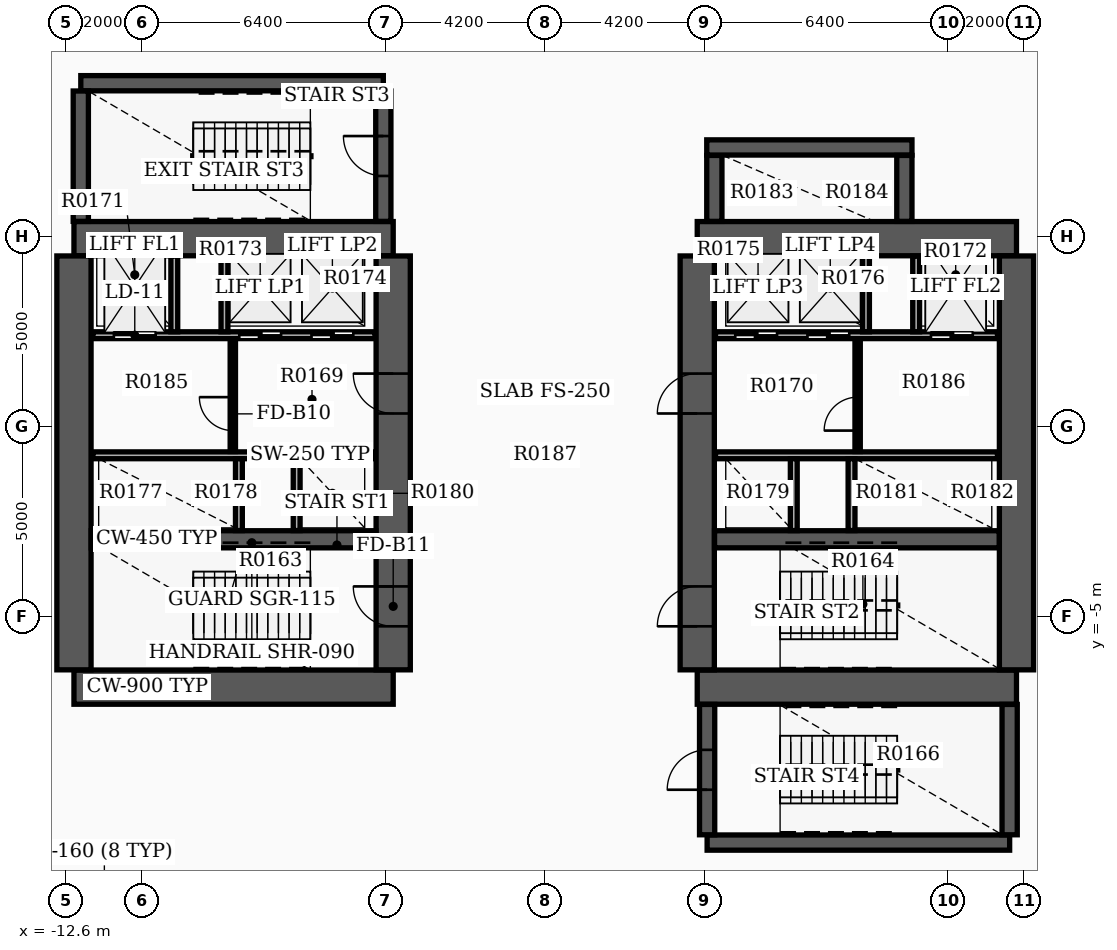
"""IFC4 building model, lengths in metres.
Left out: names, types, materials, properties, quantities, classifications, styles, units other than length and angle.
Written with IfcOpenShell. Run it as: python <this file> out.ifc"""

import sys

from ifc_helpers import new_model, si_unit, direction, frame, frame_2d, origin, place, context, subcontext, project, spatial, rectangle, extrude, element, fill, save


model = new_model("IFC4")
c1 = context("Model", 3, precision=1e-05, world=origin(), true_north=direction((0.0, 1.0)))
c2 = subcontext(c1, "Body", "Model", "MODEL_VIEW")
j1 = project(units=[si_unit("LENGTHUNIT", "METRE"), si_unit("PLANEANGLEUNIT", "RADIAN")], contexts=[c1])
p1 = place(None, origin())
s1 = spatial("IfcSite", under=j1, at=p1, CompositionType="ELEMENT")
p2 = place(p1, origin())
s2 = spatial("IfcBuilding", under=s1, at=p2, CompositionType="ELEMENT")
p3 = place(p2, frame((0.0, 0.0, 10.2)))
s3 = spatial("IfcBuildingStorey", under=s2, at=p3, CompositionType="ELEMENT", Elevation=10.2)
for number, where, z_axis, x_axis in (
    (1, (-12.4, -6.85, 0.0), (0.0, 0.0, 1.0), (1.0, 0.0, 0.0)),
    (2, (-12.4, 4.95, 0.0), (0.0, 0.0, 1.0), (1.0, 0.0, 0.0)),
):
    element("IfcWall", number, at=place(p3, frame(where, z_axis=z_axis, x_axis=x_axis)), inside=s3, PredefinedType="SHEAR", context=c2, shape_type="SweptSolid", body=[
        extrude(rectangle(XDim=8.4, YDim=0.9, at=frame_2d((4.2, 0.0))), origin(), (0.0, 0.0, 1.0), 4.25),
    ])
p4 = place(p3, frame((-12.4, -6.395, 0.0), z_axis=(0.0, 0.0, 1.0), x_axis=(0.0, 1.0, 0.0)))
e3 = element("IfcWall", 3, at=p4, inside=s3, PredefinedType="SHEAR", context=c2, shape_type="SweptSolid", body=[
    extrude(rectangle(XDim=10.89, YDim=0.9, at=frame_2d((5.445, 0.0))), origin(), (0.0, 0.0, 1.0), 4.25),
])
p5 = place(p3, frame((-4.0, -6.395, 0.0), z_axis=(0.0, 0.0, 1.0), x_axis=(0.0, 1.0, 0.0)))
e4 = element("IfcWall", 4, at=p5, inside=s3, PredefinedType="SHEAR", context=c2, shape_type="SweptSolid", body=[
    extrude(rectangle(XDim=10.89, YDim=0.9, at=frame_2d((5.445, 0.0))), origin(), (0.0, 0.0, 1.0), 4.25),
])
p6 = place(p5, frame((1.145, 0.0, 0.0)))
e5 = element("IfcOpeningElement", 5, at=p6, cuts=e4, PredefinedType="OPENING", context=c2, shape_type="SweptSolid", body=[
    extrude(rectangle(XDim=1.05, YDim=2.15, at=frame_2d((0.525, 1.075))), frame((0.0, 0.46, 0.0), z_axis=(0.0, -1.0, 0.0), x_axis=(1.0, 0.0, 0.0)), (0.0, 0.0, 1.0), 0.92),
])
p7 = place(p5, frame((6.745, 0.0, 0.0)))
e6 = element("IfcOpeningElement", 6, at=p7, cuts=e4, PredefinedType="OPENING", context=c2, shape_type="SweptSolid", body=[
    extrude(rectangle(XDim=1.05, YDim=2.15, at=frame_2d((0.525, 1.075))), frame((0.0, 0.46, 0.0), z_axis=(0.0, -1.0, 0.0), x_axis=(1.0, 0.0, 0.0)), (0.0, 0.0, 1.0), 0.92),
])
p8 = place(p3, frame((-11.945, -2.96, 0.0), z_axis=(0.0, 0.0, 1.0), x_axis=(1.0, 0.0, 0.0)))
e7 = element("IfcWall", 7, at=p8, inside=s3, PredefinedType="SHEAR", context=c2, shape_type="SweptSolid", body=[
    extrude(rectangle(XDim=7.49, YDim=0.45, at=frame_2d((3.745, 0.0))), origin(), (0.0, 0.0, 1.0), 4.25),
])
for number, where, z_axis, x_axis in (
    (8, (4.0, -6.85, 0.0), (0.0, 0.0, 1.0), (1.0, 0.0, 0.0)),
    (9, (4.0, 4.95, 0.0), (0.0, 0.0, 1.0), (1.0, 0.0, 0.0)),
):
    element("IfcWall", number, at=place(p3, frame(where, z_axis=z_axis, x_axis=x_axis)), inside=s3, PredefinedType="SHEAR", context=c2, shape_type="SweptSolid", body=[
        extrude(rectangle(XDim=8.4, YDim=0.9, at=frame_2d((4.2, 0.0))), origin(), (0.0, 0.0, 1.0), 4.25),
    ])
p9 = place(p3, frame((4.0, -6.395, 0.0), z_axis=(0.0, 0.0, 1.0), x_axis=(0.0, 1.0, 0.0)))
e10 = element("IfcWall", 10, at=p9, inside=s3, PredefinedType="SHEAR", context=c2, shape_type="SweptSolid", body=[
    extrude(rectangle(XDim=10.89, YDim=0.9, at=frame_2d((5.445, 0.0))), origin(), (0.0, 0.0, 1.0), 4.25),
])
p10 = place(p9, frame((1.145, 0.0, 0.0)))
e11 = element("IfcOpeningElement", 11, at=p10, cuts=e10, PredefinedType="OPENING", context=c2, shape_type="SweptSolid", body=[
    extrude(rectangle(XDim=1.05, YDim=2.15, at=frame_2d((0.525, 1.075))), frame((0.0, 0.46, 0.0), z_axis=(0.0, -1.0, 0.0), x_axis=(1.0, 0.0, 0.0)), (0.0, 0.0, 1.0), 0.92),
])
p11 = place(p9, frame((6.745, 0.0, 0.0)))
e12 = element("IfcOpeningElement", 12, at=p11, cuts=e10, PredefinedType="OPENING", context=c2, shape_type="SweptSolid", body=[
    extrude(rectangle(XDim=1.05, YDim=2.15, at=frame_2d((0.525, 1.075))), frame((0.0, 0.46, 0.0), z_axis=(0.0, -1.0, 0.0), x_axis=(1.0, 0.0, 0.0)), (0.0, 0.0, 1.0), 0.92),
])
p12 = place(p3, frame((12.4, -6.395, 0.0), z_axis=(0.0, 0.0, 1.0), x_axis=(0.0, 1.0, 0.0)))
e13 = element("IfcWall", 13, at=p12, inside=s3, PredefinedType="SHEAR", context=c2, shape_type="SweptSolid", body=[
    extrude(rectangle(XDim=10.89, YDim=0.9, at=frame_2d((5.445, 0.0))), origin(), (0.0, 0.0, 1.0), 4.25),
])
p13 = place(p3, frame((4.455, -2.96, 0.0), z_axis=(0.0, 0.0, 1.0), x_axis=(1.0, 0.0, 0.0)))
e14 = element("IfcWall", 14, at=p13, inside=s3, PredefinedType="SHEAR", context=c2, shape_type="SweptSolid", body=[
    extrude(rectangle(XDim=7.49, YDim=0.45, at=frame_2d((3.745, 0.0))), origin(), (0.0, 0.0, 1.0), 4.25),
])
p14 = place(p3, frame((-12.22, 9.04, 0.0), z_axis=(0.0, 0.0, 1.0), x_axis=(1.0, 0.0, 0.0)))
e15 = element("IfcWall", 15, at=p14, inside=s3, PredefinedType="SHEAR", context=c2, shape_type="SweptSolid", body=[
    extrude(rectangle(XDim=7.96, YDim=0.4, at=frame_2d((3.98, 0.0))), origin(), (0.0, 0.0, 1.0), 4.25),
])
p15 = place(p3, frame((-12.22, 5.405, 0.0), z_axis=(0.0, 0.0, 1.0), x_axis=(0.0, 1.0, 0.0)))
e16 = element("IfcWall", 16, at=p15, inside=s3, PredefinedType="SHEAR", context=c2, shape_type="SweptSolid", body=[
    extrude(rectangle(XDim=3.43, YDim=0.4, at=frame_2d((1.715, 0.0))), origin(), (0.0, 0.0, 1.0), 4.25),
])
p16 = place(p3, frame((-4.26, 5.405, 0.0), z_axis=(0.0, 0.0, 1.0), x_axis=(0.0, 1.0, 0.0)))
e17 = element("IfcWall", 17, at=p16, inside=s3, PredefinedType="SHEAR", context=c2, shape_type="SweptSolid", body=[
    extrude(rectangle(XDim=3.43, YDim=0.4, at=frame_2d((1.715, 0.0))), origin(), (0.0, 0.0, 1.0), 4.25),
])
p17 = place(p16, frame((1.195, 0.0, 0.0)))
e18 = element("IfcOpeningElement", 18, at=p17, cuts=e17, PredefinedType="OPENING", context=c2, shape_type="SweptSolid", body=[
    extrude(rectangle(XDim=1.05, YDim=2.15, at=frame_2d((0.525, 1.075))), frame((0.0, 0.21, 0.0), z_axis=(0.0, -1.0, 0.0), x_axis=(1.0, 0.0, 0.0)), (0.0, 0.0, 1.0), 0.42),
])
p18 = place(p3, frame((4.26, -10.94, 0.0), z_axis=(0.0, 0.0, 1.0), x_axis=(1.0, 0.0, 0.0)))
e19 = element("IfcWall", 19, at=p18, inside=s3, PredefinedType="SHEAR", context=c2, shape_type="SweptSolid", body=[
    extrude(rectangle(XDim=7.96, YDim=0.4, at=frame_2d((3.98, 0.0))), origin(), (0.0, 0.0, 1.0), 4.25),
])
p19 = place(p3, frame((4.26, -10.735, 0.0), z_axis=(0.0, 0.0, 1.0), x_axis=(0.0, 1.0, 0.0)))
e20 = element("IfcWall", 20, at=p19, inside=s3, PredefinedType="SHEAR", context=c2, shape_type="SweptSolid", body=[
    extrude(rectangle(XDim=3.43, YDim=0.4, at=frame_2d((1.715, 0.0))), origin(), (0.0, 0.0, 1.0), 4.25),
])
p20 = place(p19, frame((1.185, 0.0, 0.0)))
e21 = element("IfcOpeningElement", 21, at=p20, cuts=e20, PredefinedType="OPENING", context=c2, shape_type="SweptSolid", body=[
    extrude(rectangle(XDim=1.05, YDim=2.15, at=frame_2d((0.525, 1.075))), frame((0.0, 0.21, 0.0), z_axis=(0.0, -1.0, 0.0), x_axis=(1.0, 0.0, 0.0)), (0.0, 0.0, 1.0), 0.42),
])
p21 = place(p3, frame((12.22, -10.735, 0.0), z_axis=(0.0, 0.0, 1.0), x_axis=(0.0, 1.0, 0.0)))
e22 = element("IfcWall", 22, at=p21, inside=s3, PredefinedType="SHEAR", context=c2, shape_type="SweptSolid", body=[
    extrude(rectangle(XDim=3.43, YDim=0.4, at=frame_2d((1.715, 0.0))), origin(), (0.0, 0.0, 1.0), 4.25),
])
p22 = place(p3, frame((4.45, 5.405, 0.0), z_axis=(0.0, 0.0, 1.0), x_axis=(0.0, 1.0, 0.0)))
e23 = element("IfcWall", 23, at=p22, inside=s3, PredefinedType="SHEAR", context=c2, shape_type="SweptSolid", body=[
    extrude(rectangle(XDim=1.735, YDim=0.4, at=frame_2d((0.867, 0.0))), origin(), (0.0, 0.0, 1.0), 4.25),
])
p23 = place(p3, frame((4.25, 7.35, 0.0), z_axis=(0.0, 0.0, 1.0), x_axis=(1.0, 0.0, 0.0)))
e24 = element("IfcWall", 24, at=p23, inside=s3, PredefinedType="SHEAR", context=c2, shape_type="SweptSolid", body=[
    extrude(rectangle(XDim=5.4, YDim=0.4, at=frame_2d((2.7, 0.0))), origin(), (0.0, 0.0, 1.0), 4.25),
])
p24 = place(p3, frame((9.45, 5.405, 0.0), z_axis=(0.0, 0.0, 1.0), x_axis=(0.0, 1.0, 0.0)))
e25 = element("IfcWall", 25, at=p24, inside=s3, PredefinedType="SHEAR", context=c2, shape_type="SweptSolid", body=[
    extrude(rectangle(XDim=1.735, YDim=0.4, at=frame_2d((0.867, 0.0))), origin(), (0.0, 0.0, 1.0), 4.25),
])
p25 = place(p3, frame((-11.9, 2.41, 0.0), z_axis=(0.0, 0.0, 1.0), x_axis=(1.0, 0.0, 0.0)))
e26 = element("IfcWall", 26, at=p25, inside=s3, PredefinedType="SOLIDWALL", context=c2, shape_type="SweptSolid", body=[
    extrude(rectangle(XDim=7.42, YDim=0.18, at=frame_2d((3.71, 0.0))), origin(), (0.0, 0.0, 1.0), 3.32),
])
p26 = place(p25, frame((0.55, 0.0, 0.0)))
e27 = element("IfcOpeningElement", 27, at=p26, cuts=e26, PredefinedType="OPENING", context=c2, shape_type="SweptSolid", body=[
    extrude(rectangle(XDim=1.1, YDim=2.15, at=frame_2d((0.55, 1.075))), frame((0.0, 0.1, 0.0), z_axis=(0.0, -1.0, 0.0), x_axis=(1.0, 0.0, 0.0)), (0.0, 0.0, 1.0), 0.2),
])
p27 = place(p25, frame((3.85, 0.0, 0.0)))
e28 = element("IfcOpeningElement", 28, at=p27, cuts=e26, PredefinedType="OPENING", context=c2, shape_type="SweptSolid", body=[
    extrude(rectangle(XDim=1.1, YDim=2.15, at=frame_2d((0.55, 1.075))), frame((0.0, 0.1, 0.0), z_axis=(0.0, -1.0, 0.0), x_axis=(1.0, 0.0, 0.0)), (0.0, 0.0, 1.0), 0.2),
])
p28 = place(p25, frame((5.75, 0.0, 0.0)))
e29 = element("IfcOpeningElement", 29, at=p28, cuts=e26, PredefinedType="OPENING", context=c2, shape_type="SweptSolid", body=[
    extrude(rectangle(XDim=1.1, YDim=2.15, at=frame_2d((0.55, 1.075))), frame((0.0, 0.1, 0.0), z_axis=(0.0, -1.0, 0.0), x_axis=(1.0, 0.0, 0.0)), (0.0, 0.0, 1.0), 0.2),
])
p29 = place(p3, frame((4.48, 2.41, 0.0), z_axis=(0.0, 0.0, 1.0), x_axis=(1.0, 0.0, 0.0)))
e30 = element("IfcWall", 30, at=p29, inside=s3, PredefinedType="SOLIDWALL", context=c2, shape_type="SweptSolid", body=[
    extrude(rectangle(XDim=7.42, YDim=0.18, at=frame_2d((3.71, 0.0))), origin(), (0.0, 0.0, 1.0), 3.32),
])
p30 = place(p29, frame((5.67, 0.0, 0.0)))
e31 = element("IfcOpeningElement", 31, at=p30, cuts=e30, PredefinedType="OPENING", context=c2, shape_type="SweptSolid", body=[
    extrude(rectangle(XDim=1.1, YDim=2.15, at=frame_2d((0.55, 1.075))), frame((0.0, 0.1, 0.0), z_axis=(0.0, -1.0, 0.0), x_axis=(1.0, 0.0, 0.0)), (0.0, 0.0, 1.0), 0.2),
])
p31 = place(p29, frame((0.52, 0.0, 0.0)))
e32 = element("IfcOpeningElement", 32, at=p31, cuts=e30, PredefinedType="OPENING", context=c2, shape_type="SweptSolid", body=[
    extrude(rectangle(XDim=1.1, YDim=2.15, at=frame_2d((0.55, 1.075))), frame((0.0, 0.1, 0.0), z_axis=(0.0, -1.0, 0.0), x_axis=(1.0, 0.0, 0.0)), (0.0, 0.0, 1.0), 0.2),
])
p32 = place(p29, frame((2.42, 0.0, 0.0)))
e33 = element("IfcOpeningElement", 33, at=p32, cuts=e30, PredefinedType="OPENING", context=c2, shape_type="SweptSolid", body=[
    extrude(rectangle(XDim=1.1, YDim=2.15, at=frame_2d((0.55, 1.075))), frame((0.0, 0.1, 0.0), z_axis=(0.0, -1.0, 0.0), x_axis=(1.0, 0.0, 0.0)), (0.0, 0.0, 1.0), 0.2),
])
for number, where, z_axis, x_axis in (
    (34, (-11.9, -0.75, 0.0), (0.0, 0.0, 1.0), (1.0, 0.0, 0.0)),
    (35, (4.48, -0.75, 0.0), (0.0, 0.0, 1.0), (1.0, 0.0, 0.0)),
):
    element("IfcWall", number, at=place(p3, frame(where, z_axis=z_axis, x_axis=x_axis)), inside=s3, PredefinedType="SOLIDWALL", context=c2, shape_type="SweptSolid", body=[
        extrude(rectangle(XDim=7.42, YDim=0.18, at=frame_2d((3.71, 0.0))), origin(), (0.0, 0.0, 1.0), 3.32),
    ])
for number, where, z_axis, x_axis in (
    (36, (-9.76, 2.5, 0.0), (0.0, 0.0, 1.0), (0.0, 1.0, 0.0)),
    (37, (-8.44, 2.5, 0.0), (0.0, 0.0, 1.0), (0.0, 1.0, 0.0)),
    (38, (8.44, 2.5, 0.0), (0.0, 0.0, 1.0), (0.0, 1.0, 0.0)),
    (39, (9.76, 2.5, 0.0), (0.0, 0.0, 1.0), (0.0, 1.0, 0.0)),
):
    element("IfcWall", number, at=place(p3, frame(where, z_axis=z_axis, x_axis=x_axis)), inside=s3, PredefinedType="SOLIDWALL", context=c2, shape_type="SweptSolid", body=[
        extrude(rectangle(XDim=1.99, YDim=0.18, at=frame_2d((0.995, 0.0))), origin(), (0.0, 0.0, 1.0), 3.32),
    ])
for number, where, z_axis, x_axis in (
    (40, (-8.06, -2.73, 0.0), (0.0, 0.0, 1.0), (0.0, 1.0, 0.0)),
    (41, (-6.54, -2.73, 0.0), (0.0, 0.0, 1.0), (0.0, 1.0, 0.0)),
    (42, (6.54, -2.73, 0.0), (0.0, 0.0, 1.0), (0.0, 1.0, 0.0)),
    (43, (8.06, -2.73, 0.0), (0.0, 0.0, 1.0), (0.0, 1.0, 0.0)),
):
    element("IfcWall", number, at=place(p3, frame(where, z_axis=z_axis, x_axis=x_axis)), inside=s3, PredefinedType="SOLIDWALL", context=c2, shape_type="SweptSolid", body=[
        extrude(rectangle(XDim=1.89, YDim=0.18, at=frame_2d((0.945, 0.0))), origin(), (0.0, 0.0, 1.0), 3.32),
    ])
p33 = place(p3, frame((-8.22, -0.65, 0.0), z_axis=(0.0, 0.0, 1.0), x_axis=(0.0, 1.0, 0.0)))
e44 = element("IfcWall", 44, at=p33, inside=s3, PredefinedType="SOLIDWALL", context=c2, shape_type="SweptSolid", body=[
    extrude(rectangle(XDim=2.96, YDim=0.14, at=frame_2d((1.48, 0.0))), origin(), (0.0, 0.0, 1.0), 3.32),
])
p34 = place(p33, frame((0.55, 0.0, 0.0)))
e45 = element("IfcOpeningElement", 45, at=p34, cuts=e44, PredefinedType="OPENING", context=c2, shape_type="SweptSolid", body=[
    extrude(rectangle(XDim=0.88, YDim=2.1, at=frame_2d((0.44, 1.05))), frame((0.0, 0.08, 0.0), z_axis=(0.0, -1.0, 0.0), x_axis=(1.0, 0.0, 0.0)), (0.0, 0.0, 1.0), 0.16),
])
p35 = place(p3, frame((8.22, -0.65, 0.0), z_axis=(0.0, 0.0, 1.0), x_axis=(0.0, 1.0, 0.0)))
e46 = element("IfcWall", 46, at=p35, inside=s3, PredefinedType="SOLIDWALL", context=c2, shape_type="SweptSolid", body=[
    extrude(rectangle(XDim=2.96, YDim=0.14, at=frame_2d((1.48, 0.0))), origin(), (0.0, 0.0, 1.0), 3.32),
])
p36 = place(p35, frame((0.55, 0.0, 0.0)))
e47 = element("IfcOpeningElement", 47, at=p36, cuts=e46, PredefinedType="OPENING", context=c2, shape_type="SweptSolid", body=[
    extrude(rectangle(XDim=0.88, YDim=2.1, at=frame_2d((0.44, 1.05))), frame((0.0, 0.08, 0.0), z_axis=(0.0, -1.0, 0.0), x_axis=(1.0, 0.0, 0.0)), (0.0, 0.0, 1.0), 0.16),
])
p37 = place(p6, origin())
e48 = element("IfcDoor", 48, at=p37, inside=s3, OperationType="SINGLE_SWING_RIGHT", PredefinedType="DOOR", context=c2, shape_type="SweptSolid", body=[
    extrude(rectangle(XDim=1.05, YDim=2.15, at=frame_2d((0.525, 1.075))), frame((0.0, 0.025, 0.0), z_axis=(0.0, -1.0, 0.0), x_axis=(1.0, 0.0, 0.0)), (0.0, 0.0, 1.0), 0.05),
])
fill(e5, e48)
p38 = place(p10, origin())
e49 = element("IfcDoor", 49, at=p38, inside=s3, OperationType="SINGLE_SWING_LEFT", PredefinedType="DOOR", context=c2, shape_type="SweptSolid", body=[
    extrude(rectangle(XDim=1.05, YDim=2.15, at=frame_2d((0.525, 1.075))), frame((0.0, 0.025, 0.0), z_axis=(0.0, -1.0, 0.0), x_axis=(1.0, 0.0, 0.0)), (0.0, 0.0, 1.0), 0.05),
])
fill(e11, e49)
p39 = place(p7, origin())
e50 = element("IfcDoor", 50, at=p39, inside=s3, OperationType="SINGLE_SWING_RIGHT", PredefinedType="DOOR", context=c2, shape_type="SweptSolid", body=[
    extrude(rectangle(XDim=1.05, YDim=2.15, at=frame_2d((0.525, 1.075))), frame((0.0, 0.025, 0.0), z_axis=(0.0, -1.0, 0.0), x_axis=(1.0, 0.0, 0.0)), (0.0, 0.0, 1.0), 0.05),
])
fill(e6, e50)
p40 = place(p11, origin())
e51 = element("IfcDoor", 51, at=p40, inside=s3, OperationType="SINGLE_SWING_LEFT", PredefinedType="DOOR", context=c2, shape_type="SweptSolid", body=[
    extrude(rectangle(XDim=1.05, YDim=2.15, at=frame_2d((0.525, 1.075))), frame((0.0, 0.025, 0.0), z_axis=(0.0, -1.0, 0.0), x_axis=(1.0, 0.0, 0.0)), (0.0, 0.0, 1.0), 0.05),
])
fill(e12, e51)
p41 = place(p17, origin())
e52 = element("IfcDoor", 52, at=p41, inside=s3, OperationType="SINGLE_SWING_RIGHT", PredefinedType="DOOR", context=c2, shape_type="SweptSolid", body=[
    extrude(rectangle(XDim=1.05, YDim=2.15, at=frame_2d((0.525, 1.075))), frame((0.0, 0.025, 0.0), z_axis=(0.0, -1.0, 0.0), x_axis=(1.0, 0.0, 0.0)), (0.0, 0.0, 1.0), 0.05),
])
fill(e18, e52)
p42 = place(p20, origin())
e53 = element("IfcDoor", 53, at=p42, inside=s3, OperationType="SINGLE_SWING_LEFT", PredefinedType="DOOR", context=c2, shape_type="SweptSolid", body=[
    extrude(rectangle(XDim=1.05, YDim=2.15, at=frame_2d((0.525, 1.075))), frame((0.0, 0.025, 0.0), z_axis=(0.0, -1.0, 0.0), x_axis=(1.0, 0.0, 0.0)), (0.0, 0.0, 1.0), 0.05),
])
fill(e21, e53)
p43 = place(p26, origin())
e54 = element("IfcDoor", 54, at=p43, inside=s3, OperationType="DOUBLE_DOOR_SLIDING", PredefinedType="DOOR", context=c2, shape_type="SweptSolid", body=[
    extrude(rectangle(XDim=1.1, YDim=2.15, at=frame_2d((0.55, 1.075))), frame((0.0, 0.025, 0.0), z_axis=(0.0, -1.0, 0.0), x_axis=(1.0, 0.0, 0.0)), (0.0, 0.0, 1.0), 0.05),
])
fill(e27, e54)
p44 = place(p30, origin())
e55 = element("IfcDoor", 55, at=p44, inside=s3, OperationType="DOUBLE_DOOR_SLIDING", PredefinedType="DOOR", context=c2, shape_type="SweptSolid", body=[
    extrude(rectangle(XDim=1.1, YDim=2.15, at=frame_2d((0.55, 1.075))), frame((0.0, 0.025, 0.0), z_axis=(0.0, -1.0, 0.0), x_axis=(1.0, 0.0, 0.0)), (0.0, 0.0, 1.0), 0.05),
])
fill(e31, e55)
p45 = place(p27, origin())
e56 = element("IfcDoor", 56, at=p45, inside=s3, OperationType="DOUBLE_DOOR_SLIDING", PredefinedType="DOOR", context=c2, shape_type="SweptSolid", body=[
    extrude(rectangle(XDim=1.1, YDim=2.15, at=frame_2d((0.55, 1.075))), frame((0.0, 0.025, 0.0), z_axis=(0.0, -1.0, 0.0), x_axis=(1.0, 0.0, 0.0)), (0.0, 0.0, 1.0), 0.05),
])
fill(e28, e56)
p46 = place(p28, origin())
e57 = element("IfcDoor", 57, at=p46, inside=s3, OperationType="DOUBLE_DOOR_SLIDING", PredefinedType="DOOR", context=c2, shape_type="SweptSolid", body=[
    extrude(rectangle(XDim=1.1, YDim=2.15, at=frame_2d((0.55, 1.075))), frame((0.0, 0.025, 0.0), z_axis=(0.0, -1.0, 0.0), x_axis=(1.0, 0.0, 0.0)), (0.0, 0.0, 1.0), 0.05),
])
fill(e29, e57)
p47 = place(p31, origin())
e58 = element("IfcDoor", 58, at=p47, inside=s3, OperationType="DOUBLE_DOOR_SLIDING", PredefinedType="DOOR", context=c2, shape_type="SweptSolid", body=[
    extrude(rectangle(XDim=1.1, YDim=2.15, at=frame_2d((0.55, 1.075))), frame((0.0, 0.025, 0.0), z_axis=(0.0, -1.0, 0.0), x_axis=(1.0, 0.0, 0.0)), (0.0, 0.0, 1.0), 0.05),
])
fill(e32, e58)
p48 = place(p32, origin())
e59 = element("IfcDoor", 59, at=p48, inside=s3, OperationType="DOUBLE_DOOR_SLIDING", PredefinedType="DOOR", context=c2, shape_type="SweptSolid", body=[
    extrude(rectangle(XDim=1.1, YDim=2.15, at=frame_2d((0.55, 1.075))), frame((0.0, 0.025, 0.0), z_axis=(0.0, -1.0, 0.0), x_axis=(1.0, 0.0, 0.0)), (0.0, 0.0, 1.0), 0.05),
])
fill(e33, e59)
p49 = place(p34, origin())
e60 = element("IfcDoor", 60, at=p49, inside=s3, OperationType="SINGLE_SWING_RIGHT", PredefinedType="DOOR", context=c2, shape_type="SweptSolid", body=[
    extrude(rectangle(XDim=0.88, YDim=2.1, at=frame_2d((0.44, 1.05))), frame((0.0, 0.025, 0.0), z_axis=(0.0, -1.0, 0.0), x_axis=(1.0, 0.0, 0.0)), (0.0, 0.0, 1.0), 0.05),
])
fill(e45, e60)
p50 = place(p36, origin())
e61 = element("IfcDoor", 61, at=p50, inside=s3, OperationType="SINGLE_SWING_LEFT", PredefinedType="DOOR", context=c2, shape_type="SweptSolid", body=[
    extrude(rectangle(XDim=0.88, YDim=2.1, at=frame_2d((0.44, 1.05))), frame((0.0, 0.025, 0.0), z_axis=(0.0, -1.0, 0.0), x_axis=(1.0, 0.0, 0.0)), (0.0, 0.0, 1.0), 0.05),
])
fill(e47, e61)
save(model, sys.argv[1])
